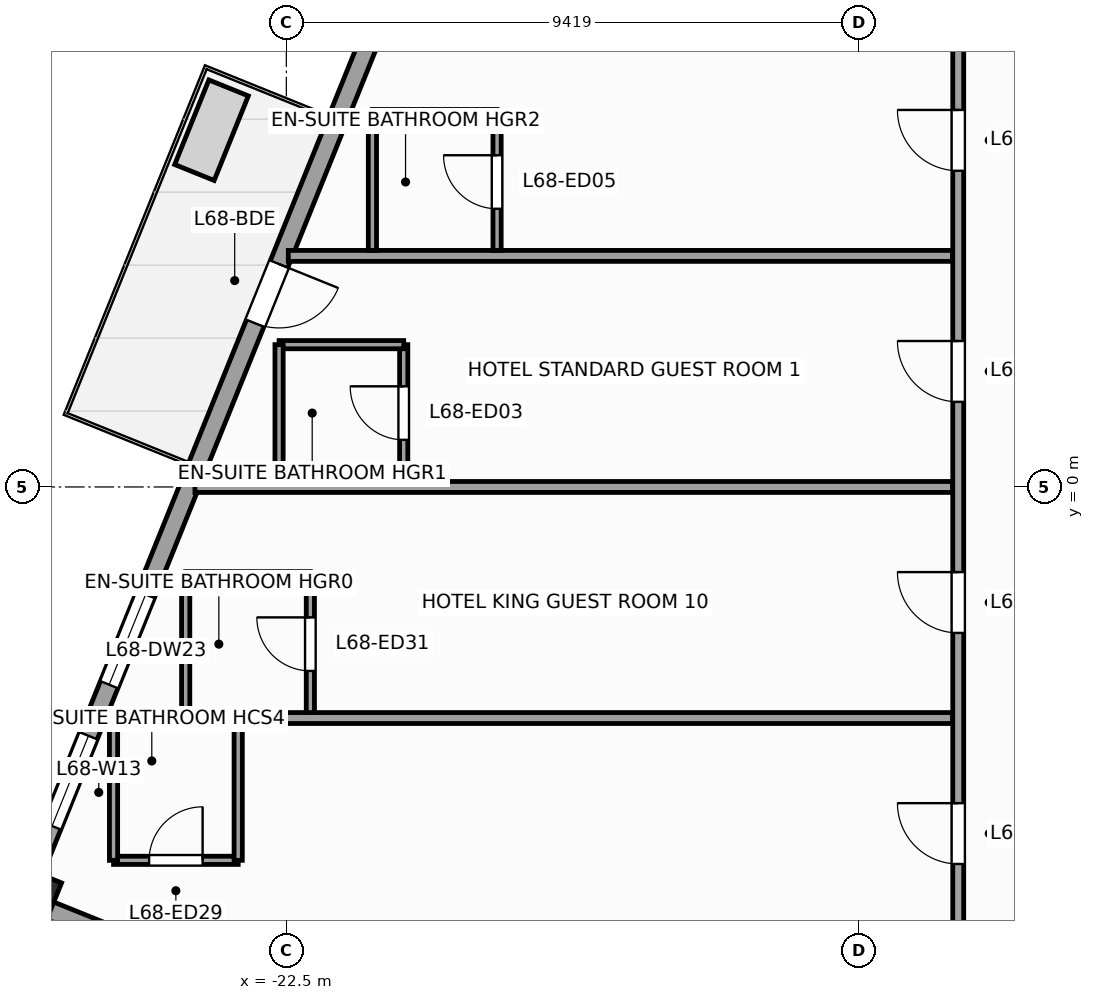
"""IFC4 building model, lengths in metres.
Left out: names, types, materials, properties, quantities, classifications, styles, units other than length and angle.
Written with IfcOpenShell. Run it as: python <this file> out.ifc"""

import sys

from ifc_helpers import new_model, si_unit, direction, frame, frame_2d, origin, origin_2d, place, context, subcontext, project, spatial, rectangle, extrude, source, transform, mapped, element, fill, save


model = new_model("IFC4")
c1 = context("Model", 3, precision=1e-05, world=origin(), true_north=direction((0.0, 1.0)))
c2 = subcontext(c1, "Body", "Model", "MODEL_VIEW")
j1 = project(units=[si_unit("LENGTHUNIT", "METRE"), si_unit("PLANEANGLEUNIT", "RADIAN")], contexts=[c1])
p1 = place(None, origin())
s1 = spatial("IfcSite", under=j1, at=p1, CompositionType="ELEMENT")
p2 = place(p1, origin())
s2 = spatial("IfcBuilding", under=s1, at=p2, CompositionType="ELEMENT")
p3 = place(p2, frame((0.0, 0.0, 279.6)))
s3 = spatial("IfcBuildingStorey", under=s2, at=p3, CompositionType="ELEMENT", Elevation=279.6)
m1 = source(origin(), c2, "Body", "SweptSolid", [
    extrude(rectangle(XDim=0.65, YDim=0.65, at=origin_2d()), origin(), (0.0, 0.0, 1.0), 3.6),
])
p4 = place(p3, frame((-26.62, -6.69, 0.0), z_axis=(0.0, 0.0, 1.0), x_axis=(0.374606593416, 0.927183854567, 0.0)))
e1 = element("IfcColumn", 1, at=p4, inside=s3, PredefinedType="COLUMN", context=c2, shape_type="MappedRepresentation", body=[
    mapped(m1, transform((0.0, 0.0, 0.0), scale=1.0)),
])
p5 = place(p3, frame((-14.479, 23.813, 0.0), z_axis=(0.0, 0.0, 1.0), x_axis=(-0.374609557019, -0.927182657188, 0.0)))
e2 = element("IfcWall", 2, at=p5, inside=s3, PredefinedType="STANDARD", context=c2, shape_type="SweptSolid", body=[
    extrude(rectangle(XDim=33.31, YDim=0.31, at=frame_2d((16.655, 0.0))), origin(), (0.0, 0.0, 1.0), 2.75),
])
p6 = place(p5, frame((21.73, 0.0, 0.0)))
e3 = element("IfcOpeningElement", 3, at=p6, cuts=e2, PredefinedType="OPENING", context=c2, shape_type="SweptSolid", body=[
    extrude(rectangle(XDim=1.05, YDim=2.25, at=frame_2d((0.525, 1.125))), frame((0.0, 0.165, 0.0), z_axis=(0.0, -1.0, 0.0), x_axis=(1.0, 0.0, 0.0)), (0.0, 0.0, 1.0), 0.33),
])
p7 = place(p5, frame((3.197, 0.0, 0.47)))
e4 = element("IfcOpeningElement", 4, at=p7, cuts=e2, PredefinedType="OPENING", context=c2, shape_type="SweptSolid", body=[
    extrude(rectangle(XDim=1.6, YDim=2.1, at=frame_2d((0.8, 1.05))), frame((0.0, 0.165, 0.0), z_axis=(0.0, -1.0, 0.0), x_axis=(1.0, 0.0, 0.0)), (0.0, 0.0, 1.0), 0.33),
])
p8 = place(p5, frame((8.86, 0.0, 0.47)))
e5 = element("IfcOpeningElement", 5, at=p8, cuts=e2, PredefinedType="OPENING", context=c2, shape_type="SweptSolid", body=[
    extrude(rectangle(XDim=1.6, YDim=2.1, at=frame_2d((0.8, 1.05))), frame((0.0, 0.165, 0.0), z_axis=(0.0, -1.0, 0.0), x_axis=(1.0, 0.0, 0.0)), (0.0, 0.0, 1.0), 0.33),
])
p9 = place(p5, frame((14.439, 0.0, 0.47)))
e6 = element("IfcOpeningElement", 6, at=p9, cuts=e2, PredefinedType="OPENING", context=c2, shape_type="SweptSolid", body=[
    extrude(rectangle(XDim=1.6, YDim=2.1, at=frame_2d((0.8, 1.05))), frame((0.0, 0.165, 0.0), z_axis=(0.0, -1.0, 0.0), x_axis=(1.0, 0.0, 0.0)), (0.0, 0.0, 1.0), 0.33),
])
p10 = place(p5, frame((30.097, 0.0, 0.47)))
e7 = element("IfcOpeningElement", 7, at=p10, cuts=e2, PredefinedType="OPENING", context=c2, shape_type="SweptSolid", body=[
    extrude(rectangle(XDim=1.6, YDim=2.1, at=frame_2d((0.8, 1.05))), frame((0.0, 0.165, 0.0), z_axis=(0.0, -1.0, 0.0), x_axis=(1.0, 0.0, 0.0)), (0.0, 0.0, 1.0), 0.33),
])
p11 = place(p5, frame((27.59, 0.0, 0.47)))
e8 = element("IfcOpeningElement", 8, at=p11, cuts=e2, PredefinedType="OPENING", context=c2, shape_type="SweptSolid", body=[
    extrude(rectangle(XDim=1.6, YDim=2.1, at=frame_2d((0.8, 1.05))), frame((0.0, 0.165, 0.0), z_axis=(0.0, -1.0, 0.0), x_axis=(1.0, 0.0, 0.0)), (0.0, 0.0, 1.0), 0.33),
])
p12 = place(p3, frame((-26.841, -6.784, 0.0), z_axis=(0.0, 0.0, 1.0), x_axis=(0.927171722085, -0.374636620962, 0.0)))
e9 = element("IfcWall", 9, at=p12, inside=s3, PredefinedType="STANDARD", context=c2, shape_type="SweptSolid", body=[
    extrude(rectangle(XDim=6.0, YDim=0.31, at=frame_2d((3.0, 0.0))), origin(), (0.0, 0.0, 1.0), 2.65),
])
p13 = place(p3, frame((-11.45, -12.35, 0.0), z_axis=(0.0, 0.0, 1.0), x_axis=(0.0, 1.0, 0.0)))
e10 = element("IfcWall", 10, at=p13, inside=s3, PredefinedType="PARTITIONING", context=c2, shape_type="SweptSolid", body=[
    extrude(rectangle(XDim=23.7, YDim=0.18, at=frame_2d((11.85, 0.0))), origin(), (0.0, 0.0, 1.0), 3.35),
])
p14 = place(p13, frame((13.75, 0.0, 0.0)))
e11 = element("IfcOpeningElement", 11, at=p14, cuts=e10, PredefinedType="OPENING", context=c2, shape_type="SweptSolid", body=[
    extrude(rectangle(XDim=1.0, YDim=2.15, at=frame_2d((0.5, 1.075))), frame((0.0, 0.1, 0.0), z_axis=(0.0, -1.0, 0.0), x_axis=(1.0, 0.0, 0.0)), (0.0, 0.0, 1.0), 0.2),
])
p15 = place(p13, frame((17.55, 0.0, 0.0)))
e12 = element("IfcOpeningElement", 12, at=p15, cuts=e10, PredefinedType="OPENING", context=c2, shape_type="SweptSolid", body=[
    extrude(rectangle(XDim=1.0, YDim=2.15, at=frame_2d((0.5, 1.075))), frame((0.0, 0.1, 0.0), z_axis=(0.0, -1.0, 0.0), x_axis=(1.0, 0.0, 0.0)), (0.0, 0.0, 1.0), 0.2),
])
p16 = place(p13, frame((6.15, 0.0, 0.0)))
e13 = element("IfcOpeningElement", 13, at=p16, cuts=e10, PredefinedType="OPENING", context=c2, shape_type="SweptSolid", body=[
    extrude(rectangle(XDim=1.0, YDim=2.15, at=frame_2d((0.5, 1.075))), frame((0.0, 0.1, 0.0), z_axis=(0.0, -1.0, 0.0), x_axis=(1.0, 0.0, 0.0)), (0.0, 0.0, 1.0), 0.2),
])
p17 = place(p13, frame((9.95, 0.0, 0.0)))
e14 = element("IfcOpeningElement", 14, at=p17, cuts=e10, PredefinedType="OPENING", context=c2, shape_type="SweptSolid", body=[
    extrude(rectangle(XDim=1.0, YDim=2.15, at=frame_2d((0.5, 1.075))), frame((0.0, 0.1, 0.0), z_axis=(0.0, -1.0, 0.0), x_axis=(1.0, 0.0, 0.0)), (0.0, 0.0, 1.0), 0.2),
])
p18 = place(p3, frame((-11.545, -3.8, 0.0), z_axis=(0.0, 0.0, 1.0), x_axis=(-1.0, 0.0, 0.0)))
e15 = element("IfcWall", 15, at=p18, inside=s3, PredefinedType="PARTITIONING", context=c2, shape_type="SweptSolid", body=[
    extrude(rectangle(XDim=13.993, YDim=0.18, at=frame_2d((6.997, 0.0))), origin(), (0.0, 0.0, 1.0), 3.35),
])
p19 = place(p3, frame((-11.545, 0.0, 0.0), z_axis=(0.0, 0.0, 1.0), x_axis=(-1.0, 0.0, 0.0)))
e16 = element("IfcWall", 16, at=p19, inside=s3, PredefinedType="PARTITIONING", context=c2, shape_type="SweptSolid", body=[
    extrude(rectangle(XDim=12.458, YDim=0.18, at=frame_2d((6.229, 0.0))), origin(), (0.0, 0.0, 1.0), 3.35),
])
p20 = place(p3, frame((-11.545, 3.8, 0.0), z_axis=(0.0, 0.0, 1.0), x_axis=(-1.0, 0.0, 0.0)))
e17 = element("IfcWall", 17, at=p20, inside=s3, PredefinedType="PARTITIONING", context=c2, shape_type="SweptSolid", body=[
    extrude(rectangle(XDim=10.923, YDim=0.18, at=frame_2d((5.461, 0.0))), origin(), (0.0, 0.0, 1.0), 3.35),
])
p21 = place(p3, frame((-20.57, 0.09, 0.0), z_axis=(0.0, 0.0, 1.0), x_axis=(0.0, 1.0, 0.0)))
e18 = element("IfcWall", 18, at=p21, inside=s3, PredefinedType="PARTITIONING", context=c2, shape_type="SweptSolid", body=[
    extrude(rectangle(XDim=2.25, YDim=0.135, at=frame_2d((1.125, 0.0))), origin(), (0.0, 0.0, 1.0), 3.35),
])
p22 = place(p21, frame((0.685, 0.0, 0.0)))
e19 = element("IfcOpeningElement", 19, at=p22, cuts=e18, PredefinedType="OPENING", context=c2, shape_type="SweptSolid", body=[
    extrude(rectangle(XDim=0.88, YDim=2.1, at=frame_2d((0.44, 1.05))), frame((0.0, 0.078, 0.0), z_axis=(0.0, -1.0, 0.0), x_axis=(1.0, 0.0, 0.0)), (0.0, 0.0, 1.0), 0.155),
])
p23 = place(p3, frame((-22.619, 2.34, 0.0), z_axis=(0.0, 0.0, 1.0), x_axis=(1.0, 0.0, 0.0)))
e20 = element("IfcWall", 20, at=p23, inside=s3, PredefinedType="PARTITIONING", context=c2, shape_type="SweptSolid", body=[
    extrude(rectangle(XDim=2.05, YDim=0.135, at=frame_2d((1.025, 0.0))), origin(), (0.0, 0.0, 1.0), 3.35),
])
p24 = place(p3, frame((-22.619, 0.09, 0.0), z_axis=(0.0, 0.0, 1.0), x_axis=(0.0, 1.0, 0.0)))
e21 = element("IfcWall", 21, at=p24, inside=s3, PredefinedType="PARTITIONING", context=c2, shape_type="SweptSolid", body=[
    extrude(rectangle(XDim=2.25, YDim=0.135, at=frame_2d((1.125, 0.0))), origin(), (0.0, 0.0, 1.0), 3.35),
])
p25 = place(p3, frame((-19.034, 3.89, 0.0), z_axis=(0.0, 0.0, 1.0), x_axis=(0.0, 1.0, 0.0)))
e22 = element("IfcWall", 22, at=p25, inside=s3, PredefinedType="PARTITIONING", context=c2, shape_type="SweptSolid", body=[
    extrude(rectangle(XDim=2.25, YDim=0.135, at=frame_2d((1.125, 0.0))), origin(), (0.0, 0.0, 1.0), 3.35),
])
p26 = place(p25, frame((0.685, 0.0, 0.0)))
e23 = element("IfcOpeningElement", 23, at=p26, cuts=e22, PredefinedType="OPENING", context=c2, shape_type="SweptSolid", body=[
    extrude(rectangle(XDim=0.88, YDim=2.1, at=frame_2d((0.44, 1.05))), frame((0.0, 0.078, 0.0), z_axis=(0.0, -1.0, 0.0), x_axis=(1.0, 0.0, 0.0)), (0.0, 0.0, 1.0), 0.155),
])
p27 = place(p3, frame((-21.084, 6.14, 0.0), z_axis=(0.0, 0.0, 1.0), x_axis=(1.0, 0.0, 0.0)))
e24 = element("IfcWall", 24, at=p27, inside=s3, PredefinedType="PARTITIONING", context=c2, shape_type="SweptSolid", body=[
    extrude(rectangle(XDim=2.05, YDim=0.135, at=frame_2d((1.025, 0.0))), origin(), (0.0, 0.0, 1.0), 3.35),
])
p28 = place(p3, frame((-21.084, 3.89, 0.0), z_axis=(0.0, 0.0, 1.0), x_axis=(0.0, 1.0, 0.0)))
e25 = element("IfcWall", 25, at=p28, inside=s3, PredefinedType="PARTITIONING", context=c2, shape_type="SweptSolid", body=[
    extrude(rectangle(XDim=2.25, YDim=0.135, at=frame_2d((1.125, 0.0))), origin(), (0.0, 0.0, 1.0), 3.35),
])
p29 = place(p3, frame((-25.342, -6.14, 0.0), z_axis=(0.0, 0.0, 1.0), x_axis=(1.0, 0.0, 0.0)))
e26 = element("IfcWall", 26, at=p29, inside=s3, PredefinedType="PARTITIONING", context=c2, shape_type="SweptSolid", body=[
    extrude(rectangle(XDim=2.05, YDim=0.135, at=frame_2d((1.025, 0.0))), origin(), (0.0, 0.0, 1.0), 3.35),
])
p30 = place(p29, frame((0.585, 0.0, 0.0)))
e27 = element("IfcOpeningElement", 27, at=p30, cuts=e26, PredefinedType="OPENING", context=c2, shape_type="SweptSolid", body=[
    extrude(rectangle(XDim=0.88, YDim=2.1, at=frame_2d((0.44, 1.05))), frame((0.0, 0.078, 0.0), z_axis=(0.0, -1.0, 0.0), x_axis=(1.0, 0.0, 0.0)), (0.0, 0.0, 1.0), 0.155),
])
p31 = place(p3, frame((-23.292, -6.14, 0.0), z_axis=(0.0, 0.0, 1.0), x_axis=(0.0, 1.0, 0.0)))
e28 = element("IfcWall", 28, at=p31, inside=s3, PredefinedType="PARTITIONING", context=c2, shape_type="SweptSolid", body=[
    extrude(rectangle(XDim=2.25, YDim=0.135, at=frame_2d((1.125, 0.0))), origin(), (0.0, 0.0, 1.0), 2.95),
])
p32 = place(p3, frame((-25.342, -6.14, 0.0), z_axis=(0.0, 0.0, 1.0), x_axis=(0.0, 1.0, 0.0)))
e29 = element("IfcWall", 29, at=p32, inside=s3, PredefinedType="PARTITIONING", context=c2, shape_type="SweptSolid", body=[
    extrude(rectangle(XDim=2.25, YDim=0.135, at=frame_2d((1.125, 0.0))), origin(), (0.0, 0.0, 1.0), 2.75),
])
p33 = place(p3, frame((-22.105, -3.71, 0.0), z_axis=(0.0, 0.0, 1.0), x_axis=(0.0, 1.0, 0.0)))
e30 = element("IfcWall", 30, at=p33, inside=s3, PredefinedType="PARTITIONING", context=c2, shape_type="SweptSolid", body=[
    extrude(rectangle(XDim=2.25, YDim=0.135, at=frame_2d((1.125, 0.0))), origin(), (0.0, 0.0, 1.0), 3.35),
])
p34 = place(p33, frame((0.685, 0.0, 0.0)))
e31 = element("IfcOpeningElement", 31, at=p34, cuts=e30, PredefinedType="OPENING", context=c2, shape_type="SweptSolid", body=[
    extrude(rectangle(XDim=0.88, YDim=2.1, at=frame_2d((0.44, 1.05))), frame((0.0, 0.078, 0.0), z_axis=(0.0, -1.0, 0.0), x_axis=(1.0, 0.0, 0.0)), (0.0, 0.0, 1.0), 0.155),
])
p35 = place(p3, frame((-24.155, -1.46, 0.0), z_axis=(0.0, 0.0, 1.0), x_axis=(1.0, 0.0, 0.0)))
e32 = element("IfcWall", 32, at=p35, inside=s3, PredefinedType="PARTITIONING", context=c2, shape_type="SweptSolid", body=[
    extrude(rectangle(XDim=2.05, YDim=0.135, at=frame_2d((1.025, 0.0))), origin(), (0.0, 0.0, 1.0), 3.35),
])
p36 = place(p3, frame((-24.155, -3.71, 0.0), z_axis=(0.0, 0.0, 1.0), x_axis=(0.0, 1.0, 0.0)))
e33 = element("IfcWall", 33, at=p36, inside=s3, PredefinedType="PARTITIONING", context=c2, shape_type="SweptSolid", body=[
    extrude(rectangle(XDim=2.25, YDim=0.135, at=frame_2d((1.125, 0.0))), origin(), (0.0, 0.0, 1.0), 3.35),
])
m2 = source(origin(), c2, "Body", "SweptSolid", [
    extrude(rectangle(XDim=1.05, YDim=2.25, at=frame_2d((0.525, 1.125))), frame((0.0, 0.025, 0.0), z_axis=(0.0, -1.0, 0.0), x_axis=(1.0, 0.0, 0.0)), (0.0, 0.0, 1.0), 0.05),
])
p37 = place(p6, origin())
e34 = element("IfcDoor", 34, at=p37, inside=s3, OperationType="SINGLE_SWING_LEFT", PredefinedType="DOOR", context=c2, shape_type="MappedRepresentation", body=[
    mapped(m2, transform((0.0, 0.0, 0.0), scale=1.0)),
])
fill(e3, e34)
m3 = source(origin(), c2, "Body", "SweptSolid", [
    extrude(rectangle(XDim=1.6, YDim=2.1, at=frame_2d((0.8, 1.05))), frame((0.0, 0.03, 0.0), z_axis=(0.0, -1.0, 0.0), x_axis=(1.0, 0.0, 0.0)), (0.0, 0.0, 1.0), 0.06),
])
p38 = place(p10, origin())
e35 = element("IfcWindow", 35, at=p38, inside=s3, PartitioningType="SINGLE_PANEL", PredefinedType="WINDOW", context=c2, shape_type="MappedRepresentation", body=[
    mapped(m3, transform((0.0, 0.0, 0.0), scale=1.0)),
])
fill(e7, e35)
m4 = source(origin(), c2, "Body", "SweptSolid", [
    extrude(rectangle(XDim=1.0, YDim=2.15, at=frame_2d((0.5, 1.075))), frame((0.0, 0.025, 0.0), z_axis=(0.0, -1.0, 0.0), x_axis=(1.0, 0.0, 0.0)), (0.0, 0.0, 1.0), 0.05),
])
p39 = place(p14, origin())
e36 = element("IfcDoor", 36, at=p39, inside=s3, OperationType="SINGLE_SWING_RIGHT", PredefinedType="DOOR", context=c2, shape_type="MappedRepresentation", body=[
    mapped(m4, transform((0.0, 0.0, 0.0), scale=1.0)),
])
fill(e11, e36)
m5 = source(origin(), c2, "Body", "SweptSolid", [
    extrude(rectangle(XDim=0.88, YDim=2.1, at=frame_2d((0.44, 1.05))), frame((0.0, 0.025, 0.0), z_axis=(0.0, -1.0, 0.0), x_axis=(1.0, 0.0, 0.0)), (0.0, 0.0, 1.0), 0.05),
])
p40 = place(p22, origin())
e37 = element("IfcDoor", 37, at=p40, inside=s3, OperationType="SINGLE_SWING_RIGHT", PredefinedType="DOOR", context=c2, shape_type="MappedRepresentation", body=[
    mapped(m5, transform((0.0, 0.0, 0.0), scale=1.0)),
])
fill(e19, e37)
p41 = place(p15, origin())
e38 = element("IfcDoor", 38, at=p41, inside=s3, OperationType="SINGLE_SWING_RIGHT", PredefinedType="DOOR", context=c2, shape_type="MappedRepresentation", body=[
    mapped(m4, transform((0.0, 0.0, 0.0), scale=1.0)),
])
fill(e12, e38)
p42 = place(p26, origin())
e39 = element("IfcDoor", 39, at=p42, inside=s3, OperationType="SINGLE_SWING_RIGHT", PredefinedType="DOOR", context=c2, shape_type="MappedRepresentation", body=[
    mapped(m5, transform((0.0, 0.0, 0.0), scale=1.0)),
])
fill(e23, e39)
p43 = place(p16, origin())
e40 = element("IfcDoor", 40, at=p43, inside=s3, OperationType="SINGLE_SWING_RIGHT", PredefinedType="DOOR", context=c2, shape_type="MappedRepresentation", body=[
    mapped(m4, transform((0.0, 0.0, 0.0), scale=1.0)),
])
fill(e13, e40)
p44 = place(p30, origin())
e41 = element("IfcDoor", 41, at=p44, inside=s3, OperationType="SINGLE_SWING_RIGHT", PredefinedType="DOOR", context=c2, shape_type="MappedRepresentation", body=[
    mapped(m5, transform((0.0, 0.0, 0.0), scale=1.0)),
])
fill(e27, e41)
p45 = place(p17, origin())
e42 = element("IfcDoor", 42, at=p45, inside=s3, OperationType="SINGLE_SWING_RIGHT", PredefinedType="DOOR", context=c2, shape_type="MappedRepresentation", body=[
    mapped(m4, transform((0.0, 0.0, 0.0), scale=1.0)),
])
fill(e14, e42)
p46 = place(p34, origin())
e43 = element("IfcDoor", 43, at=p46, inside=s3, OperationType="SINGLE_SWING_RIGHT", PredefinedType="DOOR", context=c2, shape_type="MappedRepresentation", body=[
    mapped(m5, transform((0.0, 0.0, 0.0), scale=1.0)),
])
fill(e31, e43)
p47 = place(p11, origin())
e44 = element("IfcWindow", 44, at=p47, inside=s3, PartitioningType="SINGLE_PANEL", PredefinedType="WINDOW", context=c2, shape_type="MappedRepresentation", body=[
    mapped(m3, transform((0.0, 0.0, 0.0), scale=1.0)),
])
fill(e8, e44)
save(model, sys.argv[1])
